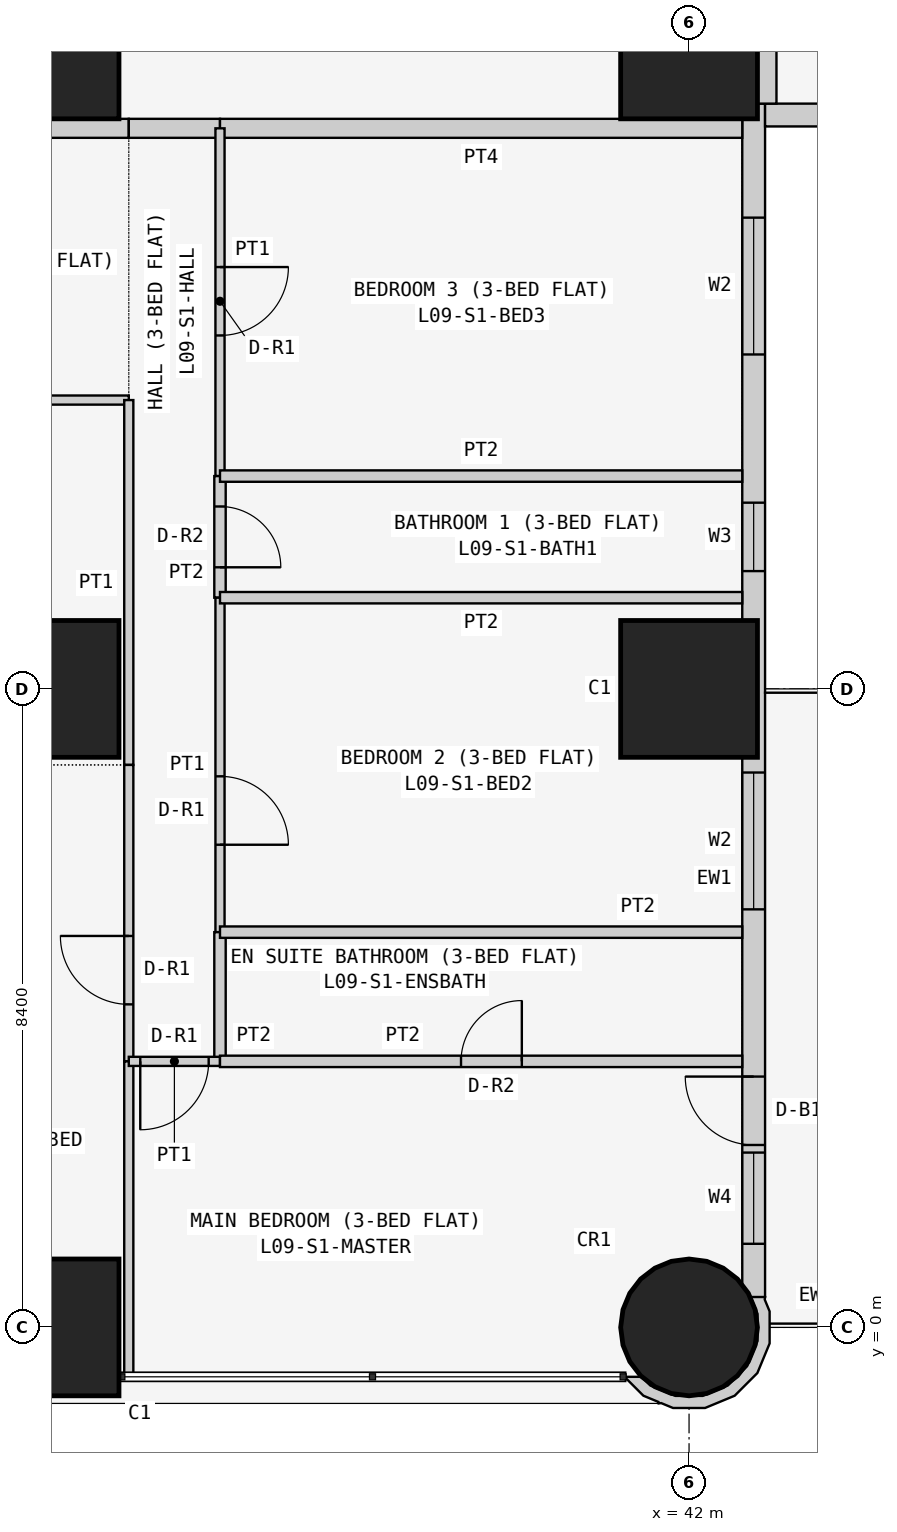
"""IFC4 building model, lengths in metres.
Left out: names, types, materials, properties, quantities, classifications, styles, units other than length and angle.
Written with IfcOpenShell. Run it as: python <this file> out.ifc"""

import sys

from ifc_helpers import new_model, si_unit, direction, frame, frame_2d, origin, origin_2d, place, context, subcontext, project, spatial, polyline, rectangle, circle, outline, extrude, element, fill, save


model = new_model("IFC4")
c1 = context("Model", 3, precision=1e-05, world=origin(), true_north=direction((0.0, 1.0)))
c2 = subcontext(c1, "Body", "Model", "MODEL_VIEW")
j1 = project(units=[si_unit("LENGTHUNIT", "METRE"), si_unit("PLANEANGLEUNIT", "RADIAN")], contexts=[c1])
p1 = place(None, origin())
s1 = spatial("IfcSite", under=j1, at=p1, CompositionType="ELEMENT")
p2 = place(p1, origin())
s2 = spatial("IfcBuilding", under=s1, at=p2, CompositionType="ELEMENT")
p3 = place(p2, frame((0.0, 0.0, 41.7)))
s3 = spatial("IfcBuildingStorey", under=s2, at=p3, CompositionType="ELEMENT", Elevation=41.7)
for number, where, z_axis, x_axis in (
    (1, (33.6, 0.0, 0.0), (0.0, 0.0, 1.0), (1.0, 0.0, 0.0)),
    (2, (33.6, 8.4, 0.0), (0.0, 0.0, 1.0), (1.0, 0.0, 0.0)),
    (3, (33.6, 16.8, 0.0), (0.0, 0.0, 1.0), (1.0, 0.0, 0.0)),
):
    element("IfcColumn", number, at=place(p3, frame(where, z_axis=z_axis, x_axis=x_axis)), inside=s3, PredefinedType="COLUMN", context=c2, shape_type="SweptSolid", body=[
        extrude(rectangle(XDim=1.8, YDim=1.8, at=origin_2d()), origin(), (0.0, 0.0, 1.0), 3.6),
    ])
p4 = place(p3, frame((42.0, 0.0, 0.0), z_axis=(0.0, 0.0, 1.0), x_axis=(1.0, 0.0, 0.0)))
e4 = element("IfcColumn", 4, at=p4, inside=s3, PredefinedType="COLUMN", context=c2, shape_type="SweptSolid", body=[
    extrude(circle(Radius=0.9, at=origin_2d()), origin(), (0.0, 0.0, 1.0), 3.6),
])
for number, where, z_axis, x_axis in (
    (5, (42.0, 8.4, 0.0), (0.0, 0.0, 1.0), (1.0, 0.0, 0.0)),
    (6, (42.0, 16.8, 0.0), (0.0, 0.0, 1.0), (1.0, 0.0, 0.0)),
):
    element("IfcColumn", number, at=place(p3, frame(where, z_axis=z_axis, x_axis=x_axis)), inside=s3, PredefinedType="COLUMN", context=c2, shape_type="SweptSolid", body=[
        extrude(rectangle(XDim=1.8, YDim=1.8, at=origin_2d()), origin(), (0.0, 0.0, 1.0), 3.6),
    ])
p5 = place(p3, frame((42.85, 0.4, 0.0), z_axis=(0.0, 0.0, 1.0), x_axis=(0.0, 1.0, 0.0)))
e7 = element("IfcWall", 7, at=p5, inside=s3, PredefinedType="SOLIDWALL", context=c2, shape_type="SweptSolid", body=[
    extrude(rectangle(XDim=15.7, YDim=0.3, at=frame_2d((7.85, 0.0))), origin(), (0.0, 0.0, 1.0), 3.45),
])
p6 = place(p5, frame((12.4, 0.0, 0.9)))
e8 = element("IfcOpeningElement", 8, at=p6, cuts=e7, PredefinedType="OPENING", context=c2, shape_type="SweptSolid", body=[
    extrude(rectangle(XDim=1.8, YDim=1.5, at=frame_2d((0.9, 0.75))), frame((0.0, 0.16, 0.0), z_axis=(0.0, -1.0, 0.0), x_axis=(1.0, 0.0, 0.0)), (0.0, 0.0, 1.0), 0.32),
])
p7 = place(p5, frame((9.55, 0.0, 1.5)))
e9 = element("IfcOpeningElement", 9, at=p7, cuts=e7, PredefinedType="OPENING", context=c2, shape_type="SweptSolid", body=[
    extrude(rectangle(XDim=0.9, YDim=0.7, at=frame_2d((0.45, 0.35))), frame((0.0, 0.16, 0.0), z_axis=(0.0, -1.0, 0.0), x_axis=(1.0, 0.0, 0.0)), (0.0, 0.0, 1.0), 0.32),
])
p8 = place(p5, frame((5.1, 0.0, 0.9)))
e10 = element("IfcOpeningElement", 10, at=p8, cuts=e7, PredefinedType="OPENING", context=c2, shape_type="SweptSolid", body=[
    extrude(rectangle(XDim=1.8, YDim=1.5, at=frame_2d((0.9, 0.75))), frame((0.0, 0.16, 0.0), z_axis=(0.0, -1.0, 0.0), x_axis=(1.0, 0.0, 0.0)), (0.0, 0.0, 1.0), 0.32),
])
p9 = place(p5, frame((2.0, 0.0, 0.0)))
e11 = element("IfcOpeningElement", 11, at=p9, cuts=e7, PredefinedType="OPENING", context=c2, shape_type="SweptSolid", body=[
    extrude(rectangle(XDim=0.9, YDim=2.4, at=frame_2d((0.45, 1.2))), frame((0.0, 0.16, 0.0), z_axis=(0.0, -1.0, 0.0), x_axis=(1.0, 0.0, 0.0)), (0.0, 0.0, 1.0), 0.32),
])
p10 = place(p5, frame((0.7, 0.0, 0.9)))
e12 = element("IfcOpeningElement", 12, at=p10, cuts=e7, PredefinedType="OPENING", context=c2, shape_type="SweptSolid", body=[
    extrude(rectangle(XDim=1.2, YDim=1.5, at=frame_2d((0.6, 0.75))), frame((0.0, 0.16, 0.0), z_axis=(0.0, -1.0, 0.0), x_axis=(1.0, 0.0, 0.0)), (0.0, 0.0, 1.0), 0.32),
])
p11 = place(p3, frame((43.0, 15.95, 0.0), z_axis=(0.0, 0.0, 1.0), x_axis=(1.0, 0.0, 0.0)))
e13 = element("IfcWall", 13, at=p11, inside=s3, PredefinedType="SOLIDWALL", context=c2, shape_type="SweptSolid", body=[
    extrude(rectangle(XDim=15.4, YDim=0.3, at=frame_2d((7.7, 0.0))), origin(), (0.0, 0.0, 1.0), 3.45),
])
p12 = place(p11, frame((1.2, 0.0, 0.9)))
e14 = element("IfcOpeningElement", 14, at=p12, cuts=e13, PredefinedType="OPENING", context=c2, shape_type="SweptSolid", body=[
    extrude(rectangle(XDim=1.8, YDim=1.5, at=frame_2d((0.9, 0.75))), frame((0.0, 0.16, 0.0), z_axis=(0.0, -1.0, 0.0), x_axis=(1.0, 0.0, 0.0)), (0.0, 0.0, 1.0), 0.32),
])
p13 = place(p11, frame((4.95, 0.0, 1.5)))
e15 = element("IfcOpeningElement", 15, at=p13, cuts=e13, PredefinedType="OPENING", context=c2, shape_type="SweptSolid", body=[
    extrude(rectangle(XDim=0.9, YDim=0.7, at=frame_2d((0.45, 0.35))), frame((0.0, 0.16, 0.0), z_axis=(0.0, -1.0, 0.0), x_axis=(1.0, 0.0, 0.0)), (0.0, 0.0, 1.0), 0.32),
])
p14 = place(p11, frame((8.5, 0.0, 0.9)))
e16 = element("IfcOpeningElement", 16, at=p14, cuts=e13, PredefinedType="OPENING", context=c2, shape_type="SweptSolid", body=[
    extrude(rectangle(XDim=1.8, YDim=1.5, at=frame_2d((0.9, 0.75))), frame((0.0, 0.16, 0.0), z_axis=(0.0, -1.0, 0.0), x_axis=(1.0, 0.0, 0.0)), (0.0, 0.0, 1.0), 0.32),
])
p15 = place(p11, frame((12.5, 0.0, 0.0)))
e17 = element("IfcOpeningElement", 17, at=p15, cuts=e13, PredefinedType="OPENING", context=c2, shape_type="SweptSolid", body=[
    extrude(rectangle(XDim=0.9, YDim=2.4, at=frame_2d((0.45, 1.2))), frame((0.0, 0.16, 0.0), z_axis=(0.0, -1.0, 0.0), x_axis=(1.0, 0.0, 0.0)), (0.0, 0.0, 1.0), 0.32),
])
p16 = place(p11, frame((13.5, 0.0, 0.9)))
e18 = element("IfcOpeningElement", 18, at=p16, cuts=e13, PredefinedType="OPENING", context=c2, shape_type="SweptSolid", body=[
    extrude(rectangle(XDim=1.2, YDim=1.5, at=frame_2d((0.6, 0.75))), frame((0.0, 0.16, 0.0), z_axis=(0.0, -1.0, 0.0), x_axis=(1.0, 0.0, 0.0)), (0.0, 0.0, 1.0), 0.32),
])
p17 = place(p3, frame((41.233, -0.611, 0.0), z_axis=(0.0, 0.0, 1.0), x_axis=(0.377204953059, -0.926129809145, 0.0)))
e19 = element("IfcWall", 19, at=p17, inside=s3, PredefinedType="SOLIDWALL", context=c2, shape_type="SweptSolid", body=[
    extrude(outline(polyline([(0.319, 1.843), (-0.072, 2.001), (-0.24, 2.001), (-0.269, 2.017), (-0.37, 1.841), (-0.102, 1.842), (0.23, 1.707), (0.485, 1.455), (0.624, 1.125), (0.626, 0.766), (0.49, 0.434), (0.239, 0.179), (0.09, 0.117), (0.011, -0.078), (0.024, -0.083), (0.33, 0.045), (0.48, 0.197), (0.499, 0.193), (0.508, 0.225), (0.626, 0.345), (0.785, 0.736), (0.782, 1.157), (0.619, 1.546), (0.319, 1.843)])), origin(), (0.0, 0.0, 1.0), 3.45),
])
p18 = place(p3, frame((43.025, 22.971, 0.0), z_axis=(0.0, 0.0, 1.0), x_axis=(0.0, -1.0, 0.0)))
e20 = element("IfcWall", 20, at=p18, inside=s3, PredefinedType="PARTITIONING", context=c2, shape_type="SweptSolid", body=[
    extrude(rectangle(XDim=6.871, YDim=0.25, at=frame_2d((3.436, 0.0))), origin(), (0.0, 0.0, 1.0), 3.45),
])
p19 = place(p3, frame((34.629, 15.775, 0.0), z_axis=(0.0, 0.0, 1.0), x_axis=(-1.0, 0.0, 0.0)))
e21 = element("IfcWall", 21, at=p19, inside=s3, PredefinedType="PARTITIONING", context=c2, shape_type="SweptSolid", body=[
    extrude(rectangle(XDim=5.229, YDim=0.25, at=frame_2d((2.615, 0.0))), origin(), (0.0, 0.0, 1.0), 3.45),
])
p20 = place(p19, frame((2.129, 0.0, 0.0)))
e22 = element("IfcOpeningElement", 22, at=p20, cuts=e21, PredefinedType="OPENING", context=c2, shape_type="SweptSolid", body=[
    extrude(rectangle(XDim=1.0, YDim=2.1, at=frame_2d((0.5, 1.05))), frame((0.0, 0.135, 0.0), z_axis=(0.0, -1.0, 0.0), x_axis=(1.0, 0.0, 0.0)), (0.0, 0.0, 1.0), 0.27),
])
p21 = place(p3, frame((35.829, 15.775, 0.0), z_axis=(0.0, 0.0, 1.0), x_axis=(-1.0, 0.0, 0.0)))
e23 = element("IfcWall", 23, at=p21, inside=s3, PredefinedType="PARTITIONING", context=c2, shape_type="SweptSolid", body=[
    extrude(rectangle(XDim=1.2, YDim=0.25, at=frame_2d((0.6, 0.0))), origin(), (0.0, 0.0, 1.0), 3.45),
])
p22 = place(p3, frame((42.7, 15.775, 0.0), z_axis=(0.0, 0.0, 1.0), x_axis=(-1.0, 0.0, 0.0)))
e24 = element("IfcWall", 24, at=p22, inside=s3, PredefinedType="PARTITIONING", context=c2, shape_type="SweptSolid", body=[
    extrude(rectangle(XDim=6.871, YDim=0.25, at=frame_2d((3.436, 0.0))), origin(), (0.0, 0.0, 1.0), 3.45),
])
p23 = place(p3, frame((29.4, 12.2, 0.0), z_axis=(0.0, 0.0, 1.0), x_axis=(1.0, 0.0, 0.0)))
e25 = element("IfcWall", 25, at=p23, inside=s3, PredefinedType="PARTITIONING", context=c2, shape_type="SweptSolid", body=[
    extrude(rectangle(XDim=5.229, YDim=0.12, at=frame_2d((2.615, 0.0))), origin(), (0.0, 0.0, 1.0), 3.45),
])
p24 = place(p23, frame((1.05, 0.0, 0.0)))
e26 = element("IfcOpeningElement", 26, at=p24, cuts=e25, PredefinedType="OPENING", context=c2, shape_type="SweptSolid", body=[
    extrude(rectangle(XDim=0.9, YDim=2.1, at=frame_2d((0.45, 1.05))), frame((0.0, 0.07, 0.0), z_axis=(0.0, -1.0, 0.0), x_axis=(1.0, 0.0, 0.0)), (0.0, 0.0, 1.0), 0.14),
])
p25 = place(p3, frame((34.629, 7.4, 0.0), z_axis=(0.0, 0.0, 1.0), x_axis=(0.0, 1.0, 0.0)))
e27 = element("IfcWall", 27, at=p25, inside=s3, PredefinedType="PARTITIONING", context=c2, shape_type="SweptSolid", body=[
    extrude(rectangle(XDim=4.8, YDim=0.12, at=frame_2d((2.4, 0.0))), origin(), (0.0, 0.0, 1.0), 3.45),
])
p26 = place(p3, frame((34.629, 3.5, 0.0), z_axis=(0.0, 0.0, 1.0), x_axis=(0.0, 1.0, 0.0)))
e28 = element("IfcWall", 28, at=p26, inside=s3, PredefinedType="PARTITIONING", context=c2, shape_type="SweptSolid", body=[
    extrude(rectangle(XDim=3.9, YDim=0.12, at=frame_2d((1.95, 0.0))), origin(), (0.0, 0.0, 1.0), 3.45),
])
p27 = place(p26, frame((0.75, 0.0, 0.0)))
e29 = element("IfcOpeningElement", 29, at=p27, cuts=e28, PredefinedType="OPENING", context=c2, shape_type="SweptSolid", body=[
    extrude(rectangle(XDim=0.9, YDim=2.1, at=frame_2d((0.45, 1.05))), frame((0.0, 0.07, 0.0), z_axis=(0.0, -1.0, 0.0), x_axis=(1.0, 0.0, 0.0)), (0.0, 0.0, 1.0), 0.14),
])
p28 = place(p3, frame((34.629, -0.65, 0.0), z_axis=(0.0, 0.0, 1.0), x_axis=(0.0, 1.0, 0.0)))
e30 = element("IfcWall", 30, at=p28, inside=s3, PredefinedType="PARTITIONING", context=c2, shape_type="SweptSolid", body=[
    extrude(rectangle(XDim=4.15, YDim=0.12, at=frame_2d((2.075, 0.0))), origin(), (0.0, 0.0, 1.0), 3.45),
])
p29 = place(p3, frame((35.829, 11.2, 0.0), z_axis=(0.0, 0.0, 1.0), x_axis=(0.0, 1.0, 0.0)))
e31 = element("IfcWall", 31, at=p29, inside=s3, PredefinedType="PARTITIONING", context=c2, shape_type="SweptSolid", body=[
    extrude(rectangle(XDim=4.575, YDim=0.12, at=frame_2d((2.288, 0.0))), origin(), (0.0, 0.0, 1.0), 3.45),
])
p30 = place(p29, frame((1.85, 0.0, 0.0)))
e32 = element("IfcOpeningElement", 32, at=p30, cuts=e31, PredefinedType="OPENING", context=c2, shape_type="SweptSolid", body=[
    extrude(rectangle(XDim=0.9, YDim=2.1, at=frame_2d((0.45, 1.05))), frame((0.0, 0.07, 0.0), z_axis=(0.0, -1.0, 0.0), x_axis=(1.0, 0.0, 0.0)), (0.0, 0.0, 1.0), 0.14),
])
p31 = place(p3, frame((35.829, 9.6, 0.0), z_axis=(0.0, 0.0, 1.0), x_axis=(0.0, 1.0, 0.0)))
e33 = element("IfcWall", 33, at=p31, inside=s3, PredefinedType="PARTITIONING", context=c2, shape_type="SweptSolid", body=[
    extrude(rectangle(XDim=1.6, YDim=0.15, at=frame_2d((0.8, 0.0))), origin(), (0.0, 0.0, 1.0), 3.45),
])
p32 = place(p31, frame((0.4, 0.0, 0.0)))
e34 = element("IfcOpeningElement", 34, at=p32, cuts=e33, PredefinedType="OPENING", context=c2, shape_type="SweptSolid", body=[
    extrude(rectangle(XDim=0.8, YDim=2.1, at=frame_2d((0.4, 1.05))), frame((0.0, 0.085, 0.0), z_axis=(0.0, -1.0, 0.0), x_axis=(1.0, 0.0, 0.0)), (0.0, 0.0, 1.0), 0.17),
])
p33 = place(p3, frame((35.829, 5.2, 0.0), z_axis=(0.0, 0.0, 1.0), x_axis=(0.0, 1.0, 0.0)))
e35 = element("IfcWall", 35, at=p33, inside=s3, PredefinedType="PARTITIONING", context=c2, shape_type="SweptSolid", body=[
    extrude(rectangle(XDim=4.4, YDim=0.12, at=frame_2d((2.2, 0.0))), origin(), (0.0, 0.0, 1.0), 3.45),
])
p34 = place(p33, frame((1.15, 0.0, 0.0)))
e36 = element("IfcOpeningElement", 36, at=p34, cuts=e35, PredefinedType="OPENING", context=c2, shape_type="SweptSolid", body=[
    extrude(rectangle(XDim=0.9, YDim=2.1, at=frame_2d((0.45, 1.05))), frame((0.0, 0.07, 0.0), z_axis=(0.0, -1.0, 0.0), x_axis=(1.0, 0.0, 0.0)), (0.0, 0.0, 1.0), 0.14),
])
p35 = place(p3, frame((35.829, 3.5, 0.0), z_axis=(0.0, 0.0, 1.0), x_axis=(0.0, 1.0, 0.0)))
e37 = element("IfcWall", 37, at=p35, inside=s3, PredefinedType="PARTITIONING", context=c2, shape_type="SweptSolid", body=[
    extrude(rectangle(XDim=1.7, YDim=0.15, at=frame_2d((0.85, 0.0))), origin(), (0.0, 0.0, 1.0), 3.45),
])
p36 = place(p3, frame((34.629, 3.5, 0.0), z_axis=(0.0, 0.0, 1.0), x_axis=(1.0, 0.0, 0.0)))
e38 = element("IfcWall", 38, at=p36, inside=s3, PredefinedType="PARTITIONING", context=c2, shape_type="SweptSolid", body=[
    extrude(rectangle(XDim=1.2, YDim=0.12, at=frame_2d((0.6, 0.0))), origin(), (0.0, 0.0, 1.0), 3.45),
])
p37 = place(p36, frame((0.151, 0.0, 0.0)))
e39 = element("IfcOpeningElement", 39, at=p37, cuts=e38, PredefinedType="OPENING", context=c2, shape_type="SweptSolid", body=[
    extrude(rectangle(XDim=0.9, YDim=2.1, at=frame_2d((0.45, 1.05))), frame((0.0, 0.07, 0.0), z_axis=(0.0, -1.0, 0.0), x_axis=(1.0, 0.0, 0.0)), (0.0, 0.0, 1.0), 0.14),
])
for number, where, z_axis, x_axis in (
    (40, (35.829, 11.2, 0.0), (0.0, 0.0, 1.0), (1.0, 0.0, 0.0)),
    (41, (35.829, 9.6, 0.0), (0.0, 0.0, 1.0), (1.0, 0.0, 0.0)),
    (42, (35.829, 5.2, 0.0), (0.0, 0.0, 1.0), (1.0, 0.0, 0.0)),
):
    element("IfcWall", number, at=place(p3, frame(where, z_axis=z_axis, x_axis=x_axis)), inside=s3, PredefinedType="PARTITIONING", context=c2, shape_type="SweptSolid", body=[
        extrude(rectangle(XDim=6.871, YDim=0.15, at=frame_2d((3.436, 0.0))), origin(), (0.0, 0.0, 1.0), 3.45),
    ])
p38 = place(p3, frame((35.829, 3.5, 0.0), z_axis=(0.0, 0.0, 1.0), x_axis=(1.0, 0.0, 0.0)))
e43 = element("IfcWall", 43, at=p38, inside=s3, PredefinedType="PARTITIONING", context=c2, shape_type="SweptSolid", body=[
    extrude(rectangle(XDim=6.871, YDim=0.15, at=frame_2d((3.436, 0.0))), origin(), (0.0, 0.0, 1.0), 3.45),
])
p39 = place(p38, frame((3.171, 0.0, 0.0)))
e44 = element("IfcOpeningElement", 44, at=p39, cuts=e43, PredefinedType="OPENING", context=c2, shape_type="SweptSolid", body=[
    extrude(rectangle(XDim=0.8, YDim=2.1, at=frame_2d((0.4, 1.05))), frame((0.0, 0.085, 0.0), z_axis=(0.0, -1.0, 0.0), x_axis=(1.0, 0.0, 0.0)), (0.0, 0.0, 1.0), 0.17),
])
p40 = place(p6, origin())
e45 = element("IfcWindow", 45, at=p40, inside=s3, PartitioningType="SINGLE_PANEL", PredefinedType="WINDOW", context=c2, shape_type="SweptSolid", body=[
    extrude(rectangle(XDim=1.8, YDim=1.5, at=frame_2d((0.9, 0.75))), frame((0.0, 0.03, 0.0), z_axis=(0.0, -1.0, 0.0), x_axis=(1.0, 0.0, 0.0)), (0.0, 0.0, 1.0), 0.06),
])
fill(e8, e45)
p41 = place(p7, origin())
e46 = element("IfcWindow", 46, at=p41, inside=s3, PartitioningType="SINGLE_PANEL", PredefinedType="WINDOW", context=c2, shape_type="SweptSolid", body=[
    extrude(rectangle(XDim=0.9, YDim=0.7, at=frame_2d((0.45, 0.35))), frame((0.0, 0.03, 0.0), z_axis=(0.0, -1.0, 0.0), x_axis=(1.0, 0.0, 0.0)), (0.0, 0.0, 1.0), 0.06),
])
fill(e9, e46)
p42 = place(p8, origin())
e47 = element("IfcWindow", 47, at=p42, inside=s3, PartitioningType="SINGLE_PANEL", PredefinedType="WINDOW", context=c2, shape_type="SweptSolid", body=[
    extrude(rectangle(XDim=1.8, YDim=1.5, at=frame_2d((0.9, 0.75))), frame((0.0, 0.03, 0.0), z_axis=(0.0, -1.0, 0.0), x_axis=(1.0, 0.0, 0.0)), (0.0, 0.0, 1.0), 0.06),
])
fill(e10, e47)
p43 = place(p9, origin())
e48 = element("IfcDoor", 48, at=p43, inside=s3, OperationType="SINGLE_SWING_RIGHT", PredefinedType="DOOR", context=c2, shape_type="SweptSolid", body=[
    extrude(rectangle(XDim=0.9, YDim=2.4, at=frame_2d((0.45, 1.2))), frame((0.0, 0.025, 0.0), z_axis=(0.0, -1.0, 0.0), x_axis=(1.0, 0.0, 0.0)), (0.0, 0.0, 1.0), 0.05),
])
fill(e11, e48)
p44 = place(p10, origin())
e49 = element("IfcWindow", 49, at=p44, inside=s3, PartitioningType="SINGLE_PANEL", PredefinedType="WINDOW", context=c2, shape_type="SweptSolid", body=[
    extrude(rectangle(XDim=1.2, YDim=1.5, at=frame_2d((0.6, 0.75))), frame((0.0, 0.03, 0.0), z_axis=(0.0, -1.0, 0.0), x_axis=(1.0, 0.0, 0.0)), (0.0, 0.0, 1.0), 0.06),
])
fill(e12, e49)
p45 = place(p27, origin())
e50 = element("IfcDoor", 50, at=p45, inside=s3, OperationType="SINGLE_SWING_RIGHT", PredefinedType="DOOR", context=c2, shape_type="SweptSolid", body=[
    extrude(rectangle(XDim=0.9, YDim=2.1, at=frame_2d((0.45, 1.05))), frame((0.0, 0.025, 0.0), z_axis=(0.0, -1.0, 0.0), x_axis=(1.0, 0.0, 0.0)), (0.0, 0.0, 1.0), 0.05),
])
fill(e29, e50)
p46 = place(p30, frame((0.9, 0.0, 0.0), z_axis=(0.0, 0.0, 1.0), x_axis=(-1.0, 0.0, 0.0)))
e51 = element("IfcDoor", 51, at=p46, inside=s3, OperationType="SINGLE_SWING_LEFT", PredefinedType="DOOR", context=c2, shape_type="SweptSolid", body=[
    extrude(rectangle(XDim=0.9, YDim=2.1, at=frame_2d((0.45, 1.05))), frame((0.0, 0.025, 0.0), z_axis=(0.0, -1.0, 0.0), x_axis=(1.0, 0.0, 0.0)), (0.0, 0.0, 1.0), 0.05),
])
fill(e32, e51)
p47 = place(p32, frame((0.8, 0.0, 0.0), z_axis=(0.0, 0.0, 1.0), x_axis=(-1.0, 0.0, 0.0)))
e52 = element("IfcDoor", 52, at=p47, inside=s3, OperationType="SINGLE_SWING_RIGHT", PredefinedType="DOOR", context=c2, shape_type="SweptSolid", body=[
    extrude(rectangle(XDim=0.8, YDim=2.1, at=frame_2d((0.4, 1.05))), frame((0.0, 0.025, 0.0), z_axis=(0.0, -1.0, 0.0), x_axis=(1.0, 0.0, 0.0)), (0.0, 0.0, 1.0), 0.05),
])
fill(e34, e52)
p48 = place(p34, frame((0.9, 0.0, 0.0), z_axis=(0.0, 0.0, 1.0), x_axis=(-1.0, 0.0, 0.0)))
e53 = element("IfcDoor", 53, at=p48, inside=s3, OperationType="SINGLE_SWING_RIGHT", PredefinedType="DOOR", context=c2, shape_type="SweptSolid", body=[
    extrude(rectangle(XDim=0.9, YDim=2.1, at=frame_2d((0.45, 1.05))), frame((0.0, 0.025, 0.0), z_axis=(0.0, -1.0, 0.0), x_axis=(1.0, 0.0, 0.0)), (0.0, 0.0, 1.0), 0.05),
])
fill(e36, e53)
p49 = place(p37, frame((0.9, 0.0, 0.0), z_axis=(0.0, 0.0, 1.0), x_axis=(-1.0, 0.0, 0.0)))
e54 = element("IfcDoor", 54, at=p49, inside=s3, OperationType="SINGLE_SWING_RIGHT", PredefinedType="DOOR", context=c2, shape_type="SweptSolid", body=[
    extrude(rectangle(XDim=0.9, YDim=2.1, at=frame_2d((0.45, 1.05))), frame((0.0, 0.025, 0.0), z_axis=(0.0, -1.0, 0.0), x_axis=(1.0, 0.0, 0.0)), (0.0, 0.0, 1.0), 0.05),
])
fill(e39, e54)
p50 = place(p39, origin())
e55 = element("IfcDoor", 55, at=p50, inside=s3, OperationType="SINGLE_SWING_RIGHT", PredefinedType="DOOR", context=c2, shape_type="SweptSolid", body=[
    extrude(rectangle(XDim=0.8, YDim=2.1, at=frame_2d((0.4, 1.05))), frame((0.0, 0.025, 0.0), z_axis=(0.0, -1.0, 0.0), x_axis=(1.0, 0.0, 0.0)), (0.0, 0.0, 1.0), 0.05),
])
fill(e44, e55)
save(model, sys.argv[1])
